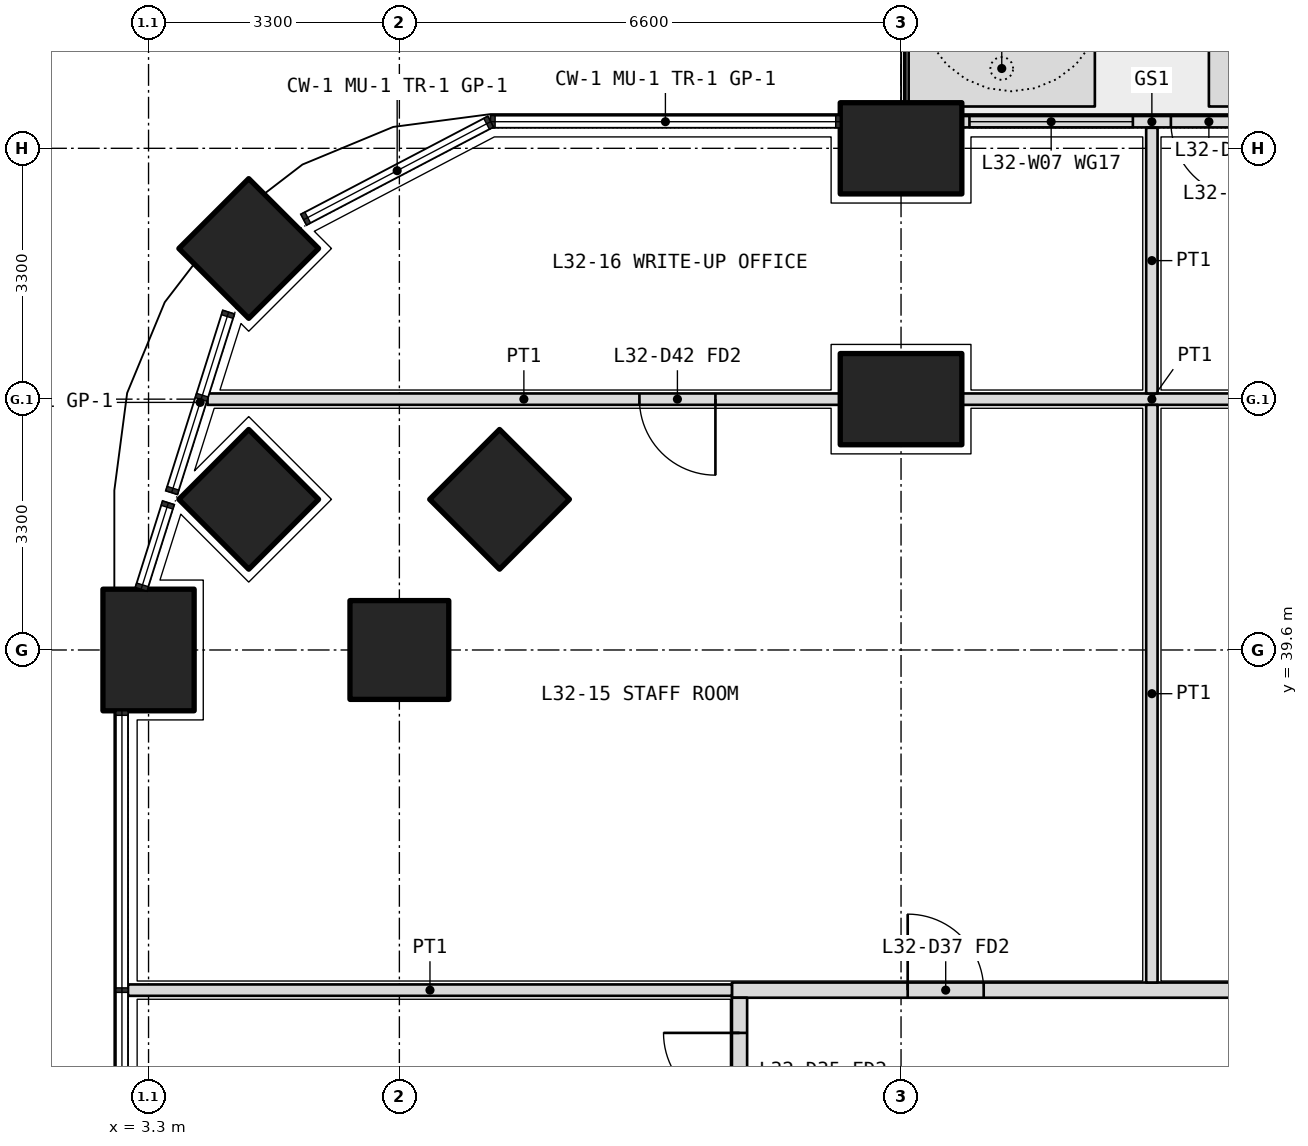
"""IFC4 building model, lengths in metres.
Left out: names, types, materials, properties, quantities, classifications, styles, units other than length and angle.
Written with IfcOpenShell. Run it as: python <this file> out.ifc"""

import sys

from ifc_helpers import new_model, si_unit, direction, frame, frame_2d, origin, origin_2d, place, context, subcontext, project, spatial, polyline, rectangle, outline, extrude, element, fill, save


model = new_model("IFC4")
c1 = context("Model", 3, precision=1e-05, world=origin(), true_north=direction((0.0, 1.0)))
c2 = subcontext(c1, "Body", "Model", "MODEL_VIEW")
j1 = project(units=[si_unit("LENGTHUNIT", "METRE"), si_unit("PLANEANGLEUNIT", "RADIAN")], contexts=[c1])
p1 = place(None, origin())
s1 = spatial("IfcSite", under=j1, at=p1, CompositionType="ELEMENT")
p2 = place(p1, origin())
s2 = spatial("IfcBuilding", under=s1, at=p2, CompositionType="ELEMENT")
p3 = place(p2, frame((0.0, 0.0, 141.0)))
s3 = spatial("IfcBuildingStorey", under=s2, at=p3, CompositionType="ELEMENT", Elevation=141.0)
p4 = place(p3, frame((4.618, 44.882, 0.0), z_axis=(0.0, 0.0, 1.0), x_axis=(0.707106781187, 0.707106781187, 0.0)))
e1 = element("IfcColumn", 1, at=p4, inside=s3, PredefinedType="COLUMN", context=c2, shape_type="SweptSolid", body=[
    extrude(rectangle(XDim=1.3, YDim=1.3, at=origin_2d()), origin(), (0.0, 0.0, 1.0), 4.2),
])
for number, where, z_axis, x_axis in (
    (2, (3.3, 39.6, 0.0), (0.0, 0.0, 1.0), (0.0, 1.0, 0.0)),
    (3, (13.2, 46.2, 0.0), (0.0, 0.0, 1.0), (1.0, 0.0, 0.0)),
):
    element("IfcColumn", number, at=place(p3, frame(where, z_axis=z_axis, x_axis=x_axis)), inside=s3, PredefinedType="COLUMN", context=c2, shape_type="SweptSolid", body=[
        extrude(rectangle(XDim=1.6, YDim=1.2, at=origin_2d()), origin(), (0.0, 0.0, 1.0), 4.2),
    ])
for number, where, z_axis, x_axis in (
    (4, (6.6, 39.6, 0.0), (0.0, 0.0, 1.0), (1.0, 0.0, 0.0)),
    (5, (4.618, 41.582, 0.0), (0.0, 0.0, 1.0), (0.707, 0.707, 0.0)),
):
    element("IfcColumn", number, at=place(p3, frame(where, z_axis=z_axis, x_axis=x_axis)), inside=s3, PredefinedType="COLUMN", context=c2, shape_type="SweptSolid", body=[
        extrude(rectangle(XDim=1.3, YDim=1.3, at=origin_2d()), origin(), (0.0, 0.0, 1.0), 4.2),
    ])
p5 = place(p3, frame((13.2, 42.9, 0.0), z_axis=(0.0, 0.0, 1.0), x_axis=(1.0, 0.0, 0.0)))
e6 = element("IfcColumn", 6, at=p5, inside=s3, PredefinedType="COLUMN", context=c2, shape_type="SweptSolid", body=[
    extrude(rectangle(XDim=1.6, YDim=1.2, at=origin_2d()), origin(), (0.0, 0.0, 1.0), 4.2),
])
p6 = place(p3, frame((7.918, 41.582, 0.0), z_axis=(0.0, 0.0, 1.0), x_axis=(0.707106781187, 0.707106781187, 0.0)))
e7 = element("IfcColumn", 7, at=p6, inside=s3, PredefinedType="COLUMN", context=c2, shape_type="SweptSolid", body=[
    extrude(rectangle(XDim=1.3, YDim=1.3, at=origin_2d()), origin(), (0.0, 0.0, 1.0), 4.2),
])
p7 = place(p3, origin())
e8 = element("IfcWall", 8, at=p7, inside=s3, PredefinedType="USERDEFINED", context=c2, shape_type="SweptSolid", body=[
    extrude(outline(polyline([(13.3, 46.75), (15.75, 46.75), (15.75, 47.75), (13.3, 47.75), (13.3, 46.75)]), holes=[polyline([(13.45, 46.9), (15.6, 46.9), (15.6, 47.6), (13.45, 47.6), (13.45, 46.9)])]), origin(), (0.0, 0.0, 1.0), 1.05),
])
p8 = place(p3, origin())
e9 = element("IfcWall", 9, at=p8, inside=s3, PredefinedType="USERDEFINED", context=c2, shape_type="SweptSolid", body=[
    extrude(outline(polyline([(17.25, 46.75), (26.3, 46.75), (26.3, 47.75), (17.25, 47.75), (17.25, 46.75)]), holes=[polyline([(17.4, 46.9), (26.15, 46.9), (26.15, 47.6), (17.4, 47.6), (17.4, 46.9)])]), origin(), (0.0, 0.0, 1.0), 1.05),
])
p9 = place(p3, frame((19.0, 46.55, 0.0), z_axis=(0.0, 0.0, 1.0), x_axis=(-1.0, 0.0, 0.0)))
e10 = element("IfcWall", 10, at=p9, inside=s3, PredefinedType="SOLIDWALL", context=c2, shape_type="SweptSolid", body=[
    extrude(rectangle(XDim=5.0, YDim=0.15, at=frame_2d((2.5, 0.0))), origin(), (0.0, 0.0, 1.0), 2.6),
])
p10 = place(p9, frame((1.25, 0.0, 0.0)))
e11 = element("IfcOpeningElement", 11, at=p10, cuts=e10, PredefinedType="OPENING", context=c2, shape_type="SweptSolid", body=[
    extrude(rectangle(XDim=1.0, YDim=2.4, at=frame_2d((0.5, 1.2))), frame((0.0, 0.085, 0.0), z_axis=(0.0, -1.0, 0.0), x_axis=(1.0, 0.0, 0.0)), (0.0, 0.0, 1.0), 0.17),
])
p11 = place(p9, frame((0.1, 0.0, 0.1)))
e12 = element("IfcOpeningElement", 12, at=p11, cuts=e10, PredefinedType="OPENING", context=c2, shape_type="SweptSolid", body=[
    extrude(rectangle(XDim=1.05, YDim=2.2, at=frame_2d((0.525, 1.1))), frame((0.0, 0.085, 0.0), z_axis=(0.0, -1.0, 0.0), x_axis=(1.0, 0.0, 0.0)), (0.0, 0.0, 1.0), 0.17),
])
p12 = place(p9, frame((2.75, 0.0, 0.1)))
e13 = element("IfcOpeningElement", 13, at=p12, cuts=e10, PredefinedType="OPENING", context=c2, shape_type="SweptSolid", body=[
    extrude(rectangle(XDim=2.15, YDim=2.2, at=frame_2d((1.075, 1.1))), frame((0.0, 0.085, 0.0), z_axis=(0.0, -1.0, 0.0), x_axis=(1.0, 0.0, 0.0)), (0.0, 0.0, 1.0), 0.17),
])
p13 = place(p3, frame((10.975, 35.125, 0.0), z_axis=(0.0, 0.0, 1.0), x_axis=(1.0, 0.0, 0.0)))
e14 = element("IfcWall", 14, at=p13, inside=s3, PredefinedType="PARTITIONING", context=c2, shape_type="SweptSolid", body=[
    extrude(rectangle(XDim=30.85, YDim=0.2, at=frame_2d((15.425, 0.0))), origin(), (0.0, 0.0, 1.0), 2.85),
])
p14 = place(p13, frame((2.312, 0.0, 0.0)))
e15 = element("IfcOpeningElement", 15, at=p14, cuts=e14, PredefinedType="OPENING", context=c2, shape_type="SweptSolid", body=[
    extrude(rectangle(XDim=1.0, YDim=2.1, at=frame_2d((0.5, 1.05))), frame((0.0, 0.11, 0.0), z_axis=(0.0, -1.0, 0.0), x_axis=(1.0, 0.0, 0.0)), (0.0, 0.0, 1.0), 0.22),
])
p15 = place(p13, frame((8.325, 0.0, 0.0)))
e16 = element("IfcOpeningElement", 16, at=p15, cuts=e14, PredefinedType="OPENING", context=c2, shape_type="SweptSolid", body=[
    extrude(rectangle(XDim=1.0, YDim=2.1, at=frame_2d((0.5, 1.05))), frame((0.0, 0.11, 0.0), z_axis=(0.0, -1.0, 0.0), x_axis=(1.0, 0.0, 0.0)), (0.0, 0.0, 1.0), 0.22),
])
p16 = place(p13, frame((13.725, 0.0, 0.0)))
e17 = element("IfcOpeningElement", 17, at=p16, cuts=e14, PredefinedType="OPENING", context=c2, shape_type="SweptSolid", body=[
    extrude(rectangle(XDim=1.0, YDim=2.1, at=frame_2d((0.5, 1.05))), frame((0.0, 0.11, 0.0), z_axis=(0.0, -1.0, 0.0), x_axis=(1.0, 0.0, 0.0)), (0.0, 0.0, 1.0), 0.22),
])
p17 = place(p13, frame((17.025, 0.0, 0.0)))
e18 = element("IfcOpeningElement", 18, at=p17, cuts=e14, PredefinedType="OPENING", context=c2, shape_type="SweptSolid", body=[
    extrude(rectangle(XDim=1.0, YDim=2.1, at=frame_2d((0.5, 1.05))), frame((0.0, 0.11, 0.0), z_axis=(0.0, -1.0, 0.0), x_axis=(1.0, 0.0, 0.0)), (0.0, 0.0, 1.0), 0.22),
])
p18 = place(p13, frame((24.238, 0.0, 0.0)))
e19 = element("IfcOpeningElement", 19, at=p18, cuts=e14, PredefinedType="OPENING", context=c2, shape_type="SweptSolid", body=[
    extrude(rectangle(XDim=1.0, YDim=2.1, at=frame_2d((0.5, 1.05))), frame((0.0, 0.11, 0.0), z_axis=(0.0, -1.0, 0.0), x_axis=(1.0, 0.0, 0.0)), (0.0, 0.0, 1.0), 0.22),
])
p19 = place(p3, frame((11.075, 7.4, 0.0), z_axis=(0.0, 0.0, 1.0), x_axis=(0.0, 1.0, 0.0)))
e20 = element("IfcWall", 20, at=p19, inside=s3, PredefinedType="PARTITIONING", context=c2, shape_type="SweptSolid", body=[
    extrude(rectangle(XDim=27.625, YDim=0.2, at=frame_2d((13.812, 0.0))), origin(), (0.0, 0.0, 1.0), 2.85),
])
p20 = place(p19, frame((2.35, 0.0, 0.0)))
e21 = element("IfcOpeningElement", 21, at=p20, cuts=e20, PredefinedType="OPENING", context=c2, shape_type="SweptSolid", body=[
    extrude(rectangle(XDim=1.0, YDim=2.1, at=frame_2d((0.5, 1.05))), frame((0.0, 0.11, 0.0), z_axis=(0.0, -1.0, 0.0), x_axis=(1.0, 0.0, 0.0)), (0.0, 0.0, 1.0), 0.22),
])
p21 = place(p19, frame((6.35, 0.0, 0.0)))
e22 = element("IfcOpeningElement", 22, at=p21, cuts=e20, PredefinedType="OPENING", context=c2, shape_type="SweptSolid", body=[
    extrude(rectangle(XDim=1.0, YDim=2.1, at=frame_2d((0.5, 1.05))), frame((0.0, 0.11, 0.0), z_axis=(0.0, -1.0, 0.0), x_axis=(1.0, 0.0, 0.0)), (0.0, 0.0, 1.0), 0.22),
])
p22 = place(p19, frame((9.4, 0.0, 0.0)))
e23 = element("IfcOpeningElement", 23, at=p22, cuts=e20, PredefinedType="OPENING", context=c2, shape_type="SweptSolid", body=[
    extrude(rectangle(XDim=0.9, YDim=2.1, at=frame_2d((0.45, 1.05))), frame((0.0, 0.11, 0.0), z_axis=(0.0, -1.0, 0.0), x_axis=(1.0, 0.0, 0.0)), (0.0, 0.0, 1.0), 0.22),
])
p23 = place(p19, frame((13.2, 0.0, 0.0)))
e24 = element("IfcOpeningElement", 24, at=p23, cuts=e20, PredefinedType="OPENING", context=c2, shape_type="SweptSolid", body=[
    extrude(rectangle(XDim=0.9, YDim=2.1, at=frame_2d((0.45, 1.05))), frame((0.0, 0.11, 0.0), z_axis=(0.0, -1.0, 0.0), x_axis=(1.0, 0.0, 0.0)), (0.0, 0.0, 1.0), 0.22),
])
p24 = place(p19, frame((16.75, 0.0, 0.0)))
e25 = element("IfcOpeningElement", 25, at=p24, cuts=e20, PredefinedType="OPENING", context=c2, shape_type="SweptSolid", body=[
    extrude(rectangle(XDim=1.0, YDim=2.1, at=frame_2d((0.5, 1.05))), frame((0.0, 0.11, 0.0), z_axis=(0.0, -1.0, 0.0), x_axis=(1.0, 0.0, 0.0)), (0.0, 0.0, 1.0), 0.22),
])
p25 = place(p19, frame((21.8, 0.0, 0.0)))
e26 = element("IfcOpeningElement", 26, at=p25, cuts=e20, PredefinedType="OPENING", context=c2, shape_type="SweptSolid", body=[
    extrude(rectangle(XDim=1.0, YDim=2.1, at=frame_2d((0.5, 1.05))), frame((0.0, 0.11, 0.0), z_axis=(0.0, -1.0, 0.0), x_axis=(1.0, 0.0, 0.0)), (0.0, 0.0, 1.0), 0.22),
])
p26 = place(p19, frame((26.163, 0.0, 0.0)))
e27 = element("IfcOpeningElement", 27, at=p26, cuts=e20, PredefinedType="OPENING", context=c2, shape_type="SweptSolid", body=[
    extrude(rectangle(XDim=1.0, YDim=2.1, at=frame_2d((0.5, 1.05))), frame((0.0, 0.11, 0.0), z_axis=(0.0, -1.0, 0.0), x_axis=(1.0, 0.0, 0.0)), (0.0, 0.0, 1.0), 0.22),
])
p27 = place(p3, frame((3.03, 35.125, 0.0), z_axis=(0.0, 0.0, 1.0), x_axis=(1.0, 0.0, 0.0)))
e28 = element("IfcWall", 28, at=p27, inside=s3, PredefinedType="PARTITIONING", context=c2, shape_type="SweptSolid", body=[
    extrude(rectangle(XDim=7.945, YDim=0.15, at=frame_2d((3.973, 0.0))), origin(), (0.0, 0.0, 1.0), 2.6),
])
p28 = place(p3, frame((19.0, 42.9, 0.0), z_axis=(0.0, 0.0, 1.0), x_axis=(-1.0, 0.0, 0.0)))
e29 = element("IfcWall", 29, at=p28, inside=s3, PredefinedType="PARTITIONING", context=c2, shape_type="SweptSolid", body=[
    extrude(rectangle(XDim=5.0, YDim=0.15, at=frame_2d((2.5, 0.0))), origin(), (0.0, 0.0, 1.0), 2.85),
])
p29 = place(p3, frame((12.4, 42.9, 0.0), z_axis=(0.0, 0.0, 1.0), x_axis=(-1.0, 0.0, 0.0)))
e30 = element("IfcWall", 30, at=p29, inside=s3, PredefinedType="PARTITIONING", context=c2, shape_type="SweptSolid", body=[
    extrude(rectangle(XDim=8.324, YDim=0.15, at=frame_2d((4.162, 0.0))), origin(), (0.0, 0.0, 1.0), 2.6),
])
p30 = place(p29, frame((1.642, 0.0, 0.0)))
e31 = element("IfcOpeningElement", 31, at=p30, cuts=e30, PredefinedType="OPENING", context=c2, shape_type="SweptSolid", body=[
    extrude(rectangle(XDim=1.0, YDim=2.1, at=frame_2d((0.5, 1.05))), frame((0.0, 0.085, 0.0), z_axis=(0.0, -1.0, 0.0), x_axis=(1.0, 0.0, 0.0)), (0.0, 0.0, 1.0), 0.17),
])
p31 = place(p3, frame((16.5, 46.47, 0.0), z_axis=(0.0, 0.0, 1.0), x_axis=(0.0, -1.0, 0.0)))
e32 = element("IfcWall", 32, at=p31, inside=s3, PredefinedType="PARTITIONING", context=c2, shape_type="SweptSolid", body=[
    extrude(rectangle(XDim=3.495, YDim=0.15, at=frame_2d((1.748, 0.0))), origin(), (0.0, 0.0, 1.0), 2.6),
])
p32 = place(p3, frame((16.5, 42.825, 0.0), z_axis=(0.0, 0.0, 1.0), x_axis=(0.0, -1.0, 0.0)))
e33 = element("IfcWall", 33, at=p32, inside=s3, PredefinedType="PARTITIONING", context=c2, shape_type="SweptSolid", body=[
    extrude(rectangle(XDim=7.6, YDim=0.15, at=frame_2d((3.8, 0.0))), origin(), (0.0, 0.0, 1.0), 3.9),
])
p33 = place(p10, origin())
e34 = element("IfcDoor", 34, at=p33, inside=s3, OperationType="SINGLE_SWING_LEFT", PredefinedType="DOOR", context=c2, shape_type="SweptSolid", body=[
    extrude(rectangle(XDim=1.0, YDim=2.4, at=frame_2d((0.5, 1.2))), frame((0.0, 0.025, 0.0), z_axis=(0.0, -1.0, 0.0), x_axis=(1.0, 0.0, 0.0)), (0.0, 0.0, 1.0), 0.05),
])
fill(e11, e34)
p34 = place(p12, origin())
e35 = element("IfcWindow", 35, at=p34, inside=s3, PartitioningType="SINGLE_PANEL", PredefinedType="WINDOW", context=c2, shape_type="SweptSolid", body=[
    extrude(rectangle(XDim=2.15, YDim=2.2, at=frame_2d((1.075, 1.1))), frame((0.0, 0.03, 0.0), z_axis=(0.0, -1.0, 0.0), x_axis=(1.0, 0.0, 0.0)), (0.0, 0.0, 1.0), 0.06),
])
fill(e13, e35)
p35 = place(p14, origin())
e36 = element("IfcDoor", 36, at=p35, inside=s3, OperationType="SINGLE_SWING_LEFT", PredefinedType="DOOR", context=c2, shape_type="SweptSolid", body=[
    extrude(rectangle(XDim=1.0, YDim=2.1, at=frame_2d((0.5, 1.05))), frame((0.0, 0.025, 0.0), z_axis=(0.0, -1.0, 0.0), x_axis=(1.0, 0.0, 0.0)), (0.0, 0.0, 1.0), 0.05),
])
fill(e15, e36)
p36 = place(p30, origin())
e37 = element("IfcDoor", 37, at=p36, inside=s3, OperationType="SINGLE_SWING_LEFT", PredefinedType="DOOR", context=c2, shape_type="SweptSolid", body=[
    extrude(rectangle(XDim=1.0, YDim=2.1, at=frame_2d((0.5, 1.05))), frame((0.0, 0.025, 0.0), z_axis=(0.0, -1.0, 0.0), x_axis=(1.0, 0.0, 0.0)), (0.0, 0.0, 1.0), 0.05),
])
fill(e31, e37)
p37 = place(p26, origin())
e38 = element("IfcDoor", 38, at=p37, inside=s3, OperationType="SINGLE_SWING_RIGHT", PredefinedType="DOOR", context=c2, shape_type="SweptSolid", body=[
    extrude(rectangle(XDim=1.0, YDim=2.1, at=frame_2d((0.5, 1.05))), frame((0.0, 0.025, 0.0), z_axis=(0.0, -1.0, 0.0), x_axis=(1.0, 0.0, 0.0)), (0.0, 0.0, 1.0), 0.05),
])
fill(e27, e38)
save(model, sys.argv[1])
